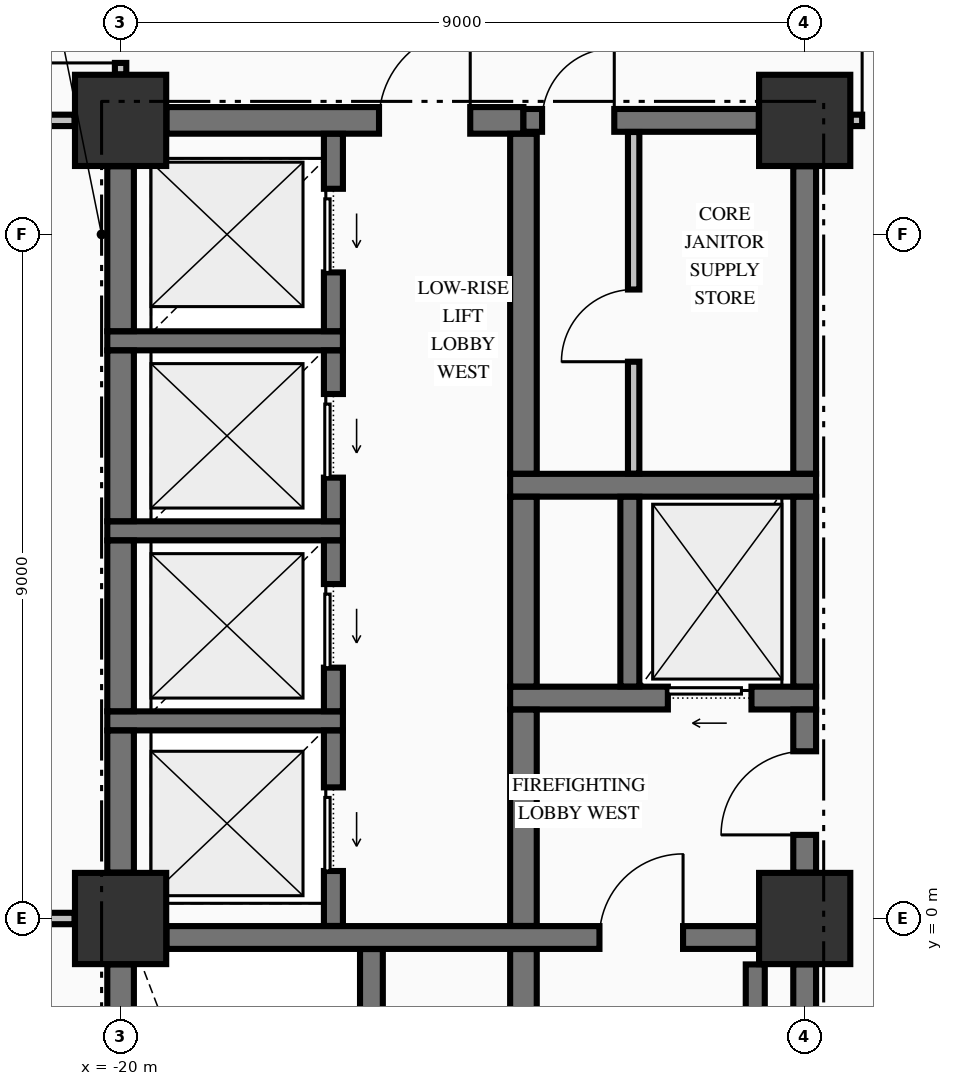
"""IFC4 building model, lengths in metres.
Left out: names, types, materials, properties, quantities, classifications, styles, units other than length and angle.
Written with IfcOpenShell. Run it as: python <this file> out.ifc"""

import sys

from ifc_helpers import new_model, si_unit, direction, frame, frame_2d, origin, origin_2d, place, context, subcontext, project, spatial, rectangle, extrude, element, fill, save


model = new_model("IFC4")
c1 = context("Model", 3, precision=1e-05, world=origin(), true_north=direction((0.0, 1.0)))
c2 = subcontext(c1, "Body", "Model", "MODEL_VIEW")
j1 = project(units=[si_unit("LENGTHUNIT", "METRE"), si_unit("PLANEANGLEUNIT", "RADIAN")], contexts=[c1])
p1 = place(None, origin())
s1 = spatial("IfcSite", under=j1, at=p1, CompositionType="ELEMENT")
p2 = place(p1, origin())
s2 = spatial("IfcBuilding", under=s1, at=p2, CompositionType="ELEMENT")
p3 = place(p2, frame((0.0, 0.0, 48.62)))
s3 = spatial("IfcBuildingStorey", under=s2, at=p3, CompositionType="ELEMENT", Elevation=48.62)
for number, where, z_axis, x_axis in (
    (1, (-20.0, 10.5, -0.25), (0.0, 0.0, 1.0), (1.0, 0.0, 0.0)),
    (2, (-11.0, 0.0, -0.25), (0.0, 0.0, 1.0), (1.0, 0.0, 0.0)),
    (3, (-11.0, 10.5, -0.25), (0.0, 0.0, 1.0), (1.0, 0.0, 0.0)),
    (4, (-20.0, 0.0, -0.25), (0.0, 0.0, 1.0), (1.0, 0.0, 0.0)),
):
    element("IfcColumn", number, at=place(p3, frame(where, z_axis=z_axis, x_axis=x_axis)), inside=s3, PredefinedType="COLUMN", context=c2, shape_type="SweptSolid", body=[
        extrude(rectangle(XDim=1.2, YDim=1.2, at=origin_2d()), origin(), (0.0, 0.0, 1.0), 3.395),
    ])
p4 = place(p3, frame((-19.396, -0.25, 0.0), z_axis=(0.0, 0.0, 1.0), x_axis=(1.0, 0.0, 0.0)))
e5 = element("IfcWall", 5, at=p4, inside=s3, PredefinedType="SHEAR", context=c2, shape_type="SweptSolid", body=[
    extrude(rectangle(XDim=7.792, YDim=0.3, at=frame_2d((3.896, 0.0))), origin(), (0.0, 0.0, 1.0), 3.145),
])
p5 = place(p4, frame((5.696, 0.0, 0.0)))
e6 = element("IfcOpeningElement", 6, at=p5, cuts=e5, PredefinedType="OPENING", context=c2, shape_type="SweptSolid", body=[
    extrude(rectangle(XDim=1.1, YDim=2.15, at=frame_2d((0.55, 1.075))), frame((0.0, 0.16, 0.0), z_axis=(0.0, -1.0, 0.0), x_axis=(1.0, 0.0, 0.0)), (0.0, 0.0, 1.0), 0.32),
])
p6 = place(p3, frame((-20.175, 2.6, 0.0), z_axis=(0.0, 0.0, 1.0), x_axis=(1.0, 0.0, 0.0)))
e7 = element("IfcWall", 7, at=p6, inside=s3, PredefinedType="SOLIDWALL", context=c2, shape_type="SweptSolid", body=[
    extrude(rectangle(XDim=3.1, YDim=0.25, at=frame_2d((1.55, 0.0))), origin(), (0.0, 0.0, 1.0), 3.145),
])
p7 = place(p3, frame((-14.875, 2.9, 0.0), z_axis=(0.0, 0.0, 1.0), x_axis=(1.0, 0.0, 0.0)))
e8 = element("IfcWall", 8, at=p7, inside=s3, PredefinedType="SHEAR", context=c2, shape_type="SweptSolid", body=[
    extrude(rectangle(XDim=4.025, YDim=0.3, at=frame_2d((2.012, 0.0))), origin(), (0.0, 0.0, 1.0), 3.145),
])
p8 = place(p7, frame((2.075, 0.0, 0.0)))
e9 = element("IfcOpeningElement", 9, at=p8, cuts=e8, PredefinedType="OPENING", context=c2, shape_type="SweptSolid", body=[
    extrude(rectangle(XDim=1.1, YDim=2.2, at=frame_2d((0.55, 1.1))), frame((0.0, 0.16, 0.0), z_axis=(0.0, -1.0, 0.0), x_axis=(1.0, 0.0, 0.0)), (0.0, 0.0, 1.0), 0.32),
])
p9 = place(p3, frame((-20.175, 5.1, 0.0), z_axis=(0.0, 0.0, 1.0), x_axis=(1.0, 0.0, 0.0)))
e10 = element("IfcWall", 10, at=p9, inside=s3, PredefinedType="SOLIDWALL", context=c2, shape_type="SweptSolid", body=[
    extrude(rectangle(XDim=3.1, YDim=0.25, at=frame_2d((1.55, 0.0))), origin(), (0.0, 0.0, 1.0), 3.145),
])
p10 = place(p3, frame((-14.875, 5.7, 0.0), z_axis=(0.0, 0.0, 1.0), x_axis=(1.0, 0.0, 0.0)))
e11 = element("IfcWall", 11, at=p10, inside=s3, PredefinedType="SHEAR", context=c2, shape_type="SweptSolid", body=[
    extrude(rectangle(XDim=4.025, YDim=0.3, at=frame_2d((2.012, 0.0))), origin(), (0.0, 0.0, 1.0), 3.145),
])
p11 = place(p3, frame((-20.175, 7.6, 0.0), z_axis=(0.0, 0.0, 1.0), x_axis=(1.0, 0.0, 0.0)))
e12 = element("IfcWall", 12, at=p11, inside=s3, PredefinedType="SOLIDWALL", context=c2, shape_type="SweptSolid", body=[
    extrude(rectangle(XDim=3.1, YDim=0.25, at=frame_2d((1.55, 0.0))), origin(), (0.0, 0.0, 1.0), 3.145),
])
p12 = place(p3, frame((-19.396, 10.5, 0.0), z_axis=(0.0, 0.0, 1.0), x_axis=(1.0, 0.0, 0.0)))
e13 = element("IfcWall", 13, at=p12, inside=s3, PredefinedType="SHEAR", context=c2, shape_type="SweptSolid", body=[
    extrude(rectangle(XDim=4.696, YDim=0.35, at=frame_2d((2.348, 0.0))), origin(), (0.0, 0.0, 1.0), 3.145),
])
p13 = place(p12, frame((2.796, 0.0, 0.0)))
e14 = element("IfcOpeningElement", 14, at=p13, cuts=e13, PredefinedType="OPENING", context=c2, shape_type="SweptSolid", body=[
    extrude(rectangle(XDim=1.2, YDim=2.15, at=frame_2d((0.6, 1.075))), frame((0.0, 0.185, 0.0), z_axis=(0.0, -1.0, 0.0), x_axis=(1.0, 0.0, 0.0)), (0.0, 0.0, 1.0), 0.37),
])
p14 = place(p3, frame((-14.7, 10.5, 0.0), z_axis=(0.0, 0.0, 1.0), x_axis=(1.0, 0.0, 0.0)))
e15 = element("IfcWall", 15, at=p14, inside=s3, PredefinedType="SHEAR", context=c2, shape_type="SweptSolid", body=[
    extrude(rectangle(XDim=3.096, YDim=0.3, at=frame_2d((1.548, 0.0))), origin(), (0.0, 0.0, 1.0), 3.145),
])
p15 = place(p14, frame((0.245, 0.0, 0.0)))
e16 = element("IfcOpeningElement", 16, at=p15, cuts=e15, PredefinedType="OPENING", context=c2, shape_type="SweptSolid", body=[
    extrude(rectangle(XDim=0.95, YDim=2.15, at=frame_2d((0.475, 1.075))), frame((0.0, 0.16, 0.0), z_axis=(0.0, -1.0, 0.0), x_axis=(1.0, 0.0, 0.0)), (0.0, 0.0, 1.0), 0.32),
])
p16 = place(p3, frame((-23.294, 0.0, 0.0), z_axis=(0.0, 0.0, 1.0), x_axis=(1.0, 0.0, 0.0)))
e17 = element("IfcWall", 17, at=p16, inside=s3, PredefinedType="PARTITIONING", context=c2, shape_type="SweptSolid", body=[
    extrude(rectangle(XDim=2.688, YDim=0.15, at=frame_2d((1.344, 0.0))), origin(), (0.0, 0.0, 1.0), 2.485),
])
p17 = place(p3, frame((-23.835, 10.5, 0.0), z_axis=(0.0, 0.0, 1.0), x_axis=(1.0, 0.0, 0.0)))
e18 = element("IfcWall", 18, at=p17, inside=s3, PredefinedType="PARTITIONING", context=c2, shape_type="SweptSolid", body=[
    extrude(rectangle(XDim=3.229, YDim=0.15, at=frame_2d((1.615, 0.0))), origin(), (0.0, 0.0, 1.0), 3.145),
])
p18 = place(p17, frame((1.36, 0.0, 0.0)))
e19 = element("IfcOpeningElement", 19, at=p18, cuts=e18, PredefinedType="OPENING", context=c2, shape_type="SweptSolid", body=[
    extrude(rectangle(XDim=0.95, YDim=2.15, at=frame_2d((0.475, 1.075))), frame((0.0, 0.085, 0.0), z_axis=(0.0, -1.0, 0.0), x_axis=(1.0, 0.0, 0.0)), (0.0, 0.0, 1.0), 0.17),
])
p19 = place(p3, frame((-10.394, 10.5, 0.0), z_axis=(0.0, 0.0, 1.0), x_axis=(1.0, 0.0, 0.0)))
e20 = element("IfcWall", 20, at=p19, inside=s3, PredefinedType="PARTITIONING", context=c2, shape_type="SweptSolid", body=[
    extrude(rectangle(XDim=20.788, YDim=0.15, at=frame_2d((10.394, 0.0))), origin(), (0.0, 0.0, 1.0), 3.145),
])
p20 = place(p19, frame((0.15, 0.0, 0.0)))
e21 = element("IfcOpeningElement", 21, at=p20, cuts=e20, PredefinedType="OPENING", context=c2, shape_type="SweptSolid", body=[
    extrude(rectangle(XDim=1.05, YDim=2.15, at=frame_2d((0.525, 1.075))), frame((0.0, 0.085, 0.0), z_axis=(0.0, -1.0, 0.0), x_axis=(1.0, 0.0, 0.0)), (0.0, 0.0, 1.0), 0.17),
])
p21 = place(p19, frame((19.588, 0.0, 0.0)))
e22 = element("IfcOpeningElement", 22, at=p21, cuts=e20, PredefinedType="OPENING", context=c2, shape_type="SweptSolid", body=[
    extrude(rectangle(XDim=1.05, YDim=2.15, at=frame_2d((0.525, 1.075))), frame((0.0, 0.085, 0.0), z_axis=(0.0, -1.0, 0.0), x_axis=(1.0, 0.0, 0.0)), (0.0, 0.0, 1.0), 0.17),
])
p22 = place(p3, frame((-20.0, -9.346, 0.0), z_axis=(0.0, 0.0, 1.0), x_axis=(0.0, 1.0, 0.0)))
e23 = element("IfcWall", 23, at=p22, inside=s3, PredefinedType="SHEAR", context=c2, shape_type="SweptSolid", body=[
    extrude(rectangle(XDim=8.742, YDim=0.35, at=frame_2d((4.371, 0.0))), origin(), (0.0, 0.0, 1.0), 3.145),
])
p23 = place(p3, frame((-20.0, 0.604, 0.0), z_axis=(0.0, 0.0, 1.0), x_axis=(0.0, 1.0, 0.0)))
e24 = element("IfcWall", 24, at=p23, inside=s3, PredefinedType="SHEAR", context=c2, shape_type="SweptSolid", body=[
    extrude(rectangle(XDim=1.869, YDim=0.35, at=frame_2d((0.935, 0.0))), origin(), (0.0, 0.0, 1.0), 3.145),
])
for number, where, z_axis, x_axis in (
    (25, (-20.0, 2.727, 0.0), (0.0, 0.0, 1.0), (0.0, 1.0, 0.0)),
    (26, (-20.0, 5.227, 0.0), (0.0, 0.0, 1.0), (0.0, 1.0, 0.0)),
):
    element("IfcWall", number, at=place(p3, frame(where, z_axis=z_axis, x_axis=x_axis)), inside=s3, PredefinedType="SHEAR", context=c2, shape_type="SweptSolid", body=[
        extrude(rectangle(XDim=2.246, YDim=0.35, at=frame_2d((1.123, 0.0))), origin(), (0.0, 0.0, 1.0), 3.145),
    ])
p24 = place(p3, frame((-20.0, 7.727, 0.0), z_axis=(0.0, 0.0, 1.0), x_axis=(0.0, 1.0, 0.0)))
e27 = element("IfcWall", 27, at=p24, inside=s3, PredefinedType="SHEAR", context=c2, shape_type="SweptSolid", body=[
    extrude(rectangle(XDim=2.169, YDim=0.35, at=frame_2d((1.084, 0.0))), origin(), (0.0, 0.0, 1.0), 3.145),
])
p25 = place(p3, frame((-17.2, -0.098, 0.0), z_axis=(0.0, 0.0, 1.0), x_axis=(0.0, 1.0, 0.0)))
e28 = element("IfcWall", 28, at=p25, inside=s3, PredefinedType="SOLIDWALL", context=c2, shape_type="SweptSolid", body=[
    extrude(rectangle(XDim=2.571, YDim=0.25, at=frame_2d((1.285, 0.0))), origin(), (0.0, 0.0, 1.0), 3.145),
])
p26 = place(p25, frame((0.723, 0.0, 0.0)))
e29 = element("IfcOpeningElement", 29, at=p26, cuts=e28, PredefinedType="OPENING", context=c2, shape_type="SweptSolid", body=[
    extrude(rectangle(XDim=1.1, YDim=2.2, at=frame_2d((0.55, 1.1))), frame((0.0, 0.135, 0.0), z_axis=(0.0, -1.0, 0.0), x_axis=(1.0, 0.0, 0.0)), (0.0, 0.0, 1.0), 0.27),
])
p27 = place(p3, frame((-17.2, 2.727, 0.0), z_axis=(0.0, 0.0, 1.0), x_axis=(0.0, 1.0, 0.0)))
e30 = element("IfcWall", 30, at=p27, inside=s3, PredefinedType="SOLIDWALL", context=c2, shape_type="SweptSolid", body=[
    extrude(rectangle(XDim=2.246, YDim=0.25, at=frame_2d((1.123, 0.0))), origin(), (0.0, 0.0, 1.0), 3.145),
])
p28 = place(p27, frame((0.573, 0.0, 0.0)))
e31 = element("IfcOpeningElement", 31, at=p28, cuts=e30, PredefinedType="OPENING", context=c2, shape_type="SweptSolid", body=[
    extrude(rectangle(XDim=1.1, YDim=2.2, at=frame_2d((0.55, 1.1))), frame((0.0, 0.135, 0.0), z_axis=(0.0, -1.0, 0.0), x_axis=(1.0, 0.0, 0.0)), (0.0, 0.0, 1.0), 0.27),
])
p29 = place(p3, frame((-17.2, 5.227, 0.0), z_axis=(0.0, 0.0, 1.0), x_axis=(0.0, 1.0, 0.0)))
e32 = element("IfcWall", 32, at=p29, inside=s3, PredefinedType="SOLIDWALL", context=c2, shape_type="SweptSolid", body=[
    extrude(rectangle(XDim=2.246, YDim=0.25, at=frame_2d((1.123, 0.0))), origin(), (0.0, 0.0, 1.0), 3.145),
])
p30 = place(p29, frame((0.573, 0.0, 0.0)))
e33 = element("IfcOpeningElement", 33, at=p30, cuts=e32, PredefinedType="OPENING", context=c2, shape_type="SweptSolid", body=[
    extrude(rectangle(XDim=1.1, YDim=2.2, at=frame_2d((0.55, 1.1))), frame((0.0, 0.135, 0.0), z_axis=(0.0, -1.0, 0.0), x_axis=(1.0, 0.0, 0.0)), (0.0, 0.0, 1.0), 0.27),
])
p31 = place(p3, frame((-17.2, 7.727, 0.0), z_axis=(0.0, 0.0, 1.0), x_axis=(0.0, 1.0, 0.0)))
e34 = element("IfcWall", 34, at=p31, inside=s3, PredefinedType="SOLIDWALL", context=c2, shape_type="SweptSolid", body=[
    extrude(rectangle(XDim=2.596, YDim=0.25, at=frame_2d((1.298, 0.0))), origin(), (0.0, 0.0, 1.0), 3.145),
])
p32 = place(p31, frame((0.773, 0.0, 0.0)))
e35 = element("IfcOpeningElement", 35, at=p32, cuts=e34, PredefinedType="OPENING", context=c2, shape_type="SweptSolid", body=[
    extrude(rectangle(XDim=1.1, YDim=2.2, at=frame_2d((0.55, 1.1))), frame((0.0, 0.135, 0.0), z_axis=(0.0, -1.0, 0.0), x_axis=(1.0, 0.0, 0.0)), (0.0, 0.0, 1.0), 0.27),
])
p33 = place(p3, frame((-16.7, -9.773, 0.0), z_axis=(0.0, 0.0, 1.0), x_axis=(0.0, 1.0, 0.0)))
e36 = element("IfcWall", 36, at=p33, inside=s3, PredefinedType="SHEAR", context=c2, shape_type="SweptSolid", body=[
    extrude(rectangle(XDim=9.371, YDim=0.3, at=frame_2d((4.686, 0.0))), origin(), (0.0, 0.0, 1.0), 3.145),
])
p34 = place(p3, frame((-14.7, -9.773, 0.0), z_axis=(0.0, 0.0, 1.0), x_axis=(0.0, 1.0, 0.0)))
e37 = element("IfcWall", 37, at=p34, inside=s3, PredefinedType="SHEAR", context=c2, shape_type="SweptSolid", body=[
    extrude(rectangle(XDim=9.371, YDim=0.35, at=frame_2d((4.686, 0.0))), origin(), (0.0, 0.0, 1.0), 3.145),
])
p35 = place(p3, frame((-14.7, -0.098, 0.0), z_axis=(0.0, 0.0, 1.0), x_axis=(0.0, 1.0, 0.0)))
e38 = element("IfcWall", 38, at=p35, inside=s3, PredefinedType="SHEAR", context=c2, shape_type="SweptSolid", body=[
    extrude(rectangle(XDim=2.846, YDim=0.35, at=frame_2d((1.423, 0.0))), origin(), (0.0, 0.0, 1.0), 3.145),
])
p36 = place(p3, frame((-14.7, 3.052, 0.0), z_axis=(0.0, 0.0, 1.0), x_axis=(0.0, 1.0, 0.0)))
e39 = element("IfcWall", 39, at=p36, inside=s3, PredefinedType="SHEAR", context=c2, shape_type="SweptSolid", body=[
    extrude(rectangle(XDim=2.496, YDim=0.35, at=frame_2d((1.248, 0.0))), origin(), (0.0, 0.0, 1.0), 3.145),
])
p37 = place(p3, frame((-14.7, 5.852, 0.0), z_axis=(0.0, 0.0, 1.0), x_axis=(0.0, 1.0, 0.0)))
e40 = element("IfcWall", 40, at=p37, inside=s3, PredefinedType="SHEAR", context=c2, shape_type="SweptSolid", body=[
    extrude(rectangle(XDim=4.471, YDim=0.35, at=frame_2d((2.235, 0.0))), origin(), (0.0, 0.0, 1.0), 3.145),
])
p38 = place(p3, frame((-13.3, 3.052, 0.0), z_axis=(0.0, 0.0, 1.0), x_axis=(0.0, 1.0, 0.0)))
e41 = element("IfcWall", 41, at=p38, inside=s3, PredefinedType="SOLIDWALL", context=c2, shape_type="SweptSolid", body=[
    extrude(rectangle(XDim=2.496, YDim=0.25, at=frame_2d((1.248, 0.0))), origin(), (0.0, 0.0, 1.0), 3.145),
])
p39 = place(p3, frame((-11.65, -9.346, 0.0), z_axis=(0.0, 0.0, 1.0), x_axis=(0.0, 1.0, 0.0)))
e42 = element("IfcWall", 42, at=p39, inside=s3, PredefinedType="SOLIDWALL", context=c2, shape_type="SweptSolid", body=[
    extrude(rectangle(XDim=8.742, YDim=0.25, at=frame_2d((4.371, 0.0))), origin(), (0.0, 0.0, 1.0), 3.145),
])
p40 = place(p3, frame((-11.0, -9.346, 0.0), z_axis=(0.0, 0.0, 1.0), x_axis=(0.0, 1.0, 0.0)))
e43 = element("IfcWall", 43, at=p40, inside=s3, PredefinedType="SHEAR", context=c2, shape_type="SweptSolid", body=[
    extrude(rectangle(XDim=8.742, YDim=0.3, at=frame_2d((4.371, 0.0))), origin(), (0.0, 0.0, 1.0), 3.145),
])
p41 = place(p3, frame((-11.0, 0.604, 0.0), z_axis=(0.0, 0.0, 1.0), x_axis=(0.0, 1.0, 0.0)))
e44 = element("IfcWall", 44, at=p41, inside=s3, PredefinedType="SHEAR", context=c2, shape_type="SweptSolid", body=[
    extrude(rectangle(XDim=2.144, YDim=0.3, at=frame_2d((1.072, 0.0))), origin(), (0.0, 0.0, 1.0), 3.145),
])
p42 = place(p41, frame((0.496, 0.0, 0.0)))
e45 = element("IfcOpeningElement", 45, at=p42, cuts=e44, PredefinedType="OPENING", context=c2, shape_type="SweptSolid", body=[
    extrude(rectangle(XDim=1.1, YDim=2.15, at=frame_2d((0.55, 1.075))), frame((0.0, 0.16, 0.0), z_axis=(0.0, -1.0, 0.0), x_axis=(1.0, 0.0, 0.0)), (0.0, 0.0, 1.0), 0.32),
])
p43 = place(p3, frame((-11.0, 3.052, 0.0), z_axis=(0.0, 0.0, 1.0), x_axis=(0.0, 1.0, 0.0)))
e46 = element("IfcWall", 46, at=p43, inside=s3, PredefinedType="SHEAR", context=c2, shape_type="SweptSolid", body=[
    extrude(rectangle(XDim=2.496, YDim=0.3, at=frame_2d((1.248, 0.0))), origin(), (0.0, 0.0, 1.0), 3.145),
])
p44 = place(p3, frame((-11.0, 5.852, 0.0), z_axis=(0.0, 0.0, 1.0), x_axis=(0.0, 1.0, 0.0)))
e47 = element("IfcWall", 47, at=p44, inside=s3, PredefinedType="SHEAR", context=c2, shape_type="SweptSolid", body=[
    extrude(rectangle(XDim=4.044, YDim=0.3, at=frame_2d((2.022, 0.0))), origin(), (0.0, 0.0, 1.0), 3.145),
])
p45 = place(p3, frame((-20.0, 11.106, 0.0), z_axis=(0.0, 0.0, 1.0), x_axis=(0.0, 1.0, 0.0)))
e48 = element("IfcWall", 48, at=p45, inside=s3, PredefinedType="PARTITIONING", context=c2, shape_type="SweptSolid", body=[
    extrude(rectangle(XDim=1.766, YDim=0.15, at=frame_2d((0.883, 0.0))), origin(), (0.0, 0.0, 1.0), 3.145),
])
p46 = place(p45, frame((0.15, 0.0, 0.0)))
e49 = element("IfcOpeningElement", 49, at=p46, cuts=e48, PredefinedType="OPENING", context=c2, shape_type="SweptSolid", body=[
    extrude(rectangle(XDim=0.95, YDim=2.15, at=frame_2d((0.475, 1.075))), frame((0.0, 0.085, 0.0), z_axis=(0.0, -1.0, 0.0), x_axis=(1.0, 0.0, 0.0)), (0.0, 0.0, 1.0), 0.17),
])
p47 = place(p3, frame((-13.25, 5.853, 0.0), z_axis=(0.0, 0.0, 1.0), x_axis=(0.0, 1.0, 0.0)))
e50 = element("IfcWall", 50, at=p47, inside=s3, PredefinedType="PARTITIONING", context=c2, shape_type="SweptSolid", body=[
    extrude(rectangle(XDim=4.494, YDim=0.15, at=frame_2d((2.247, 0.0))), origin(), (0.0, 0.0, 1.0), 3.145),
])
p48 = place(p47, frame((1.472, 0.0, 0.0)))
e51 = element("IfcOpeningElement", 51, at=p48, cuts=e50, PredefinedType="OPENING", context=c2, shape_type="SweptSolid", body=[
    extrude(rectangle(XDim=0.95, YDim=2.15, at=frame_2d((0.475, 1.075))), frame((0.0, 0.085, 0.0), z_axis=(0.0, -1.0, 0.0), x_axis=(1.0, 0.0, 0.0)), (0.0, 0.0, 1.0), 0.17),
])
p49 = place(p5, origin())
e52 = element("IfcDoor", 52, at=p49, inside=s3, OperationType="SINGLE_SWING_RIGHT", PredefinedType="DOOR", context=c2, shape_type="SweptSolid", body=[
    extrude(rectangle(XDim=1.1, YDim=2.15, at=frame_2d((0.55, 1.075))), frame((0.0, 0.025, 0.0), z_axis=(0.0, -1.0, 0.0), x_axis=(1.0, 0.0, 0.0)), (0.0, 0.0, 1.0), 0.05),
])
fill(e6, e52)
p50 = place(p42, origin())
e53 = element("IfcDoor", 53, at=p50, inside=s3, OperationType="SINGLE_SWING_LEFT", PredefinedType="DOOR", context=c2, shape_type="SweptSolid", body=[
    extrude(rectangle(XDim=1.1, YDim=2.15, at=frame_2d((0.55, 1.075))), frame((0.0, 0.025, 0.0), z_axis=(0.0, -1.0, 0.0), x_axis=(1.0, 0.0, 0.0)), (0.0, 0.0, 1.0), 0.05),
])
fill(e45, e53)
p51 = place(p8, origin())
e54 = element("IfcDoor", 54, at=p51, inside=s3, OperationType="SLIDING_TO_LEFT", PredefinedType="DOOR", context=c2, shape_type="SweptSolid", body=[
    extrude(rectangle(XDim=1.1, YDim=2.2, at=frame_2d((0.55, 1.1))), frame((0.0, 0.025, 0.0), z_axis=(0.0, -1.0, 0.0), x_axis=(1.0, 0.0, 0.0)), (0.0, 0.0, 1.0), 0.05),
])
fill(e9, e54)
p52 = place(p15, origin())
e55 = element("IfcDoor", 55, at=p52, inside=s3, OperationType="SINGLE_SWING_RIGHT", PredefinedType="DOOR", context=c2, shape_type="SweptSolid", body=[
    extrude(rectangle(XDim=0.95, YDim=2.15, at=frame_2d((0.475, 1.075))), frame((0.0, 0.025, 0.0), z_axis=(0.0, -1.0, 0.0), x_axis=(1.0, 0.0, 0.0)), (0.0, 0.0, 1.0), 0.05),
])
fill(e16, e55)
p53 = place(p48, origin())
e56 = element("IfcDoor", 56, at=p53, inside=s3, OperationType="SINGLE_SWING_LEFT", PredefinedType="DOOR", context=c2, shape_type="SweptSolid", body=[
    extrude(rectangle(XDim=0.95, YDim=2.15, at=frame_2d((0.475, 1.075))), frame((0.0, 0.025, 0.0), z_axis=(0.0, -1.0, 0.0), x_axis=(1.0, 0.0, 0.0)), (0.0, 0.0, 1.0), 0.05),
])
fill(e51, e56)
p54 = place(p13, origin())
e57 = element("IfcDoor", 57, at=p54, inside=s3, OperationType="SINGLE_SWING_RIGHT", PredefinedType="DOOR", context=c2, shape_type="SweptSolid", body=[
    extrude(rectangle(XDim=1.2, YDim=2.15, at=frame_2d((0.6, 1.075))), frame((0.0, 0.025, 0.0), z_axis=(0.0, -1.0, 0.0), x_axis=(1.0, 0.0, 0.0)), (0.0, 0.0, 1.0), 0.05),
])
fill(e14, e57)
p55 = place(p26, origin())
e58 = element("IfcDoor", 58, at=p55, inside=s3, OperationType="SLIDING_TO_LEFT", PredefinedType="DOOR", context=c2, shape_type="SweptSolid", body=[
    extrude(rectangle(XDim=1.1, YDim=2.2, at=frame_2d((0.55, 1.1))), frame((0.0, 0.025, 0.0), z_axis=(0.0, -1.0, 0.0), x_axis=(1.0, 0.0, 0.0)), (0.0, 0.0, 1.0), 0.05),
])
fill(e29, e58)
p56 = place(p28, origin())
e59 = element("IfcDoor", 59, at=p56, inside=s3, OperationType="SLIDING_TO_LEFT", PredefinedType="DOOR", context=c2, shape_type="SweptSolid", body=[
    extrude(rectangle(XDim=1.1, YDim=2.2, at=frame_2d((0.55, 1.1))), frame((0.0, 0.025, 0.0), z_axis=(0.0, -1.0, 0.0), x_axis=(1.0, 0.0, 0.0)), (0.0, 0.0, 1.0), 0.05),
])
fill(e31, e59)
p57 = place(p30, origin())
e60 = element("IfcDoor", 60, at=p57, inside=s3, OperationType="SLIDING_TO_LEFT", PredefinedType="DOOR", context=c2, shape_type="SweptSolid", body=[
    extrude(rectangle(XDim=1.1, YDim=2.2, at=frame_2d((0.55, 1.1))), frame((0.0, 0.025, 0.0), z_axis=(0.0, -1.0, 0.0), x_axis=(1.0, 0.0, 0.0)), (0.0, 0.0, 1.0), 0.05),
])
fill(e33, e60)
p58 = place(p32, origin())
e61 = element("IfcDoor", 61, at=p58, inside=s3, OperationType="SLIDING_TO_LEFT", PredefinedType="DOOR", context=c2, shape_type="SweptSolid", body=[
    extrude(rectangle(XDim=1.1, YDim=2.2, at=frame_2d((0.55, 1.1))), frame((0.0, 0.025, 0.0), z_axis=(0.0, -1.0, 0.0), x_axis=(1.0, 0.0, 0.0)), (0.0, 0.0, 1.0), 0.05),
])
fill(e35, e61)
p59 = place(p20, origin())
e62 = element("IfcDoor", 62, at=p59, inside=s3, OperationType="SINGLE_SWING_LEFT", PredefinedType="DOOR", context=c2, shape_type="SweptSolid", body=[
    extrude(rectangle(XDim=1.05, YDim=2.15, at=frame_2d((0.525, 1.075))), frame((0.0, 0.025, 0.0), z_axis=(0.0, -1.0, 0.0), x_axis=(1.0, 0.0, 0.0)), (0.0, 0.0, 1.0), 0.05),
])
fill(e21, e62)
p60 = place(p46, origin())
e63 = element("IfcDoor", 63, at=p60, inside=s3, OperationType="SINGLE_SWING_LEFT", PredefinedType="DOOR", context=c2, shape_type="SweptSolid", body=[
    extrude(rectangle(XDim=0.95, YDim=2.15, at=frame_2d((0.475, 1.075))), frame((0.0, 0.025, 0.0), z_axis=(0.0, -1.0, 0.0), x_axis=(1.0, 0.0, 0.0)), (0.0, 0.0, 1.0), 0.05),
])
fill(e49, e63)
save(model, sys.argv[1])
